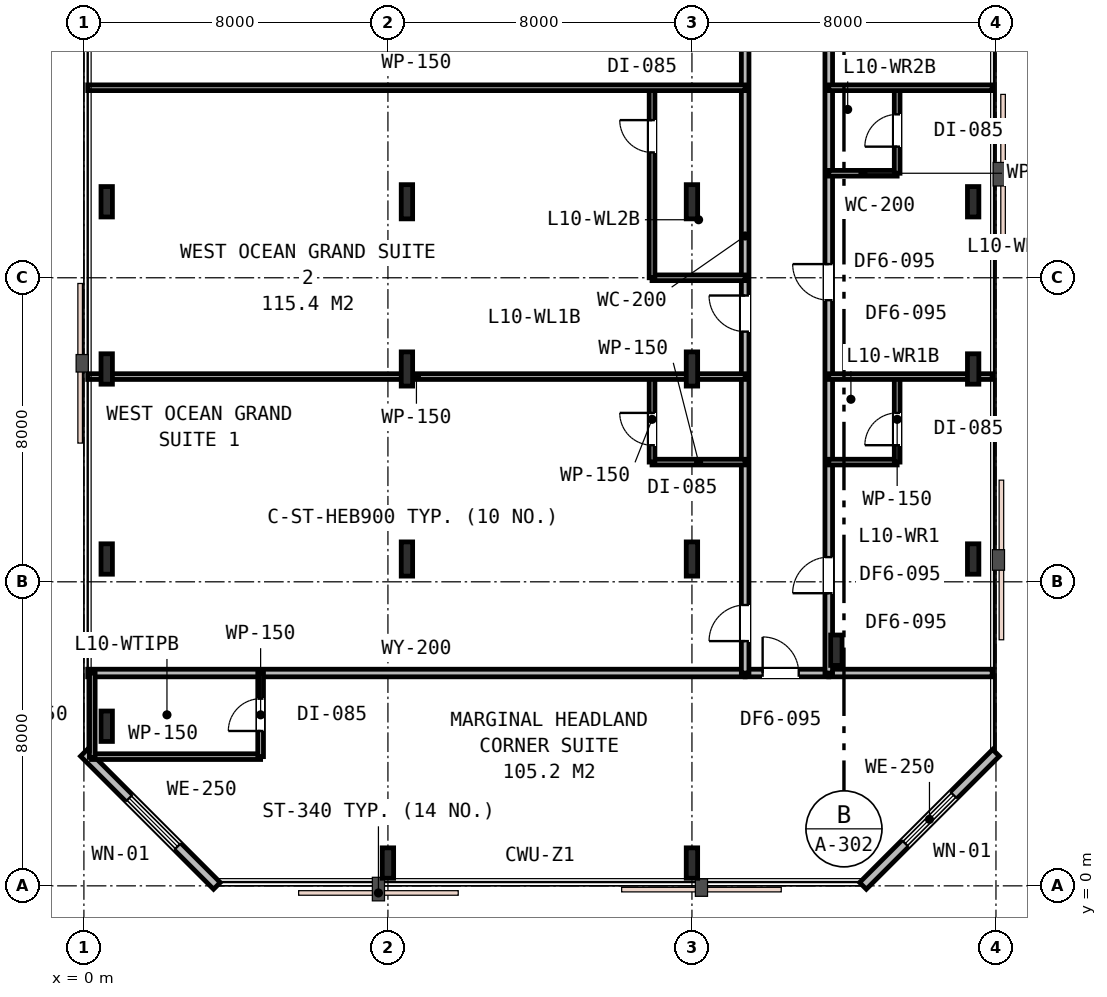
"""IFC4 building model, lengths in metres.
Left out: names, types, materials, properties, quantities, classifications, styles, units other than length and angle.
Written with IfcOpenShell. Run it as: python <this file> out.ifc"""

import sys

from ifc_helpers import new_model, si_unit, direction, frame, frame_2d, origin, origin_2d, place, context, subcontext, project, spatial, rectangle, i_section, extrude, element, fill, save


model = new_model("IFC4")
c1 = context("Model", 3, precision=1e-05, world=origin(), true_north=direction((0.0, 1.0)))
c2 = subcontext(c1, "Body", "Model", "MODEL_VIEW")
j1 = project(units=[si_unit("LENGTHUNIT", "METRE"), si_unit("PLANEANGLEUNIT", "RADIAN")], contexts=[c1])
p1 = place(None, origin())
s1 = spatial("IfcSite", under=j1, at=p1, CompositionType="ELEMENT")
p2 = place(p1, origin())
s2 = spatial("IfcBuilding", under=s1, at=p2, CompositionType="ELEMENT")
p3 = place(p2, frame((0.0, 0.0, 43.8)))
s3 = spatial("IfcBuildingStorey", under=s2, at=p3, CompositionType="ELEMENT", Elevation=43.8)
for number, where, z_axis, x_axis in (
    (1, (0.6, 8.6, 0.0), (0.0, 0.0, 1.0), (1.0, 0.0, 0.0)),
    (2, (0.6, 13.6, 0.0), (0.0, 0.0, 1.0), (1.0, 0.0, 0.0)),
    (3, (0.6, 18.0, 0.0), (0.0, 0.0, 1.0), (1.0, 0.0, 0.0)),
    (4, (0.6, 4.2, 0.0), (0.0, 0.0, 1.0), (1.0, 0.0, 0.0)),
    (5, (8.0, 0.6, 0.0), (0.0, 0.0, 1.0), (1.0, 0.0, 0.0)),
    (6, (16.0, 0.6, 0.0), (0.0, 0.0, 1.0), (1.0, 0.0, 0.0)),
    (7, (19.8, 6.2, 0.0), (0.0, 0.0, 1.0), (1.0, 0.0, 0.0)),
    (8, (23.4, 8.6, 0.0), (0.0, 0.0, 1.0), (1.0, 0.0, 0.0)),
    (9, (23.4, 13.6, 0.0), (0.0, 0.0, 1.0), (1.0, 0.0, 0.0)),
    (10, (23.4, 18.0, 0.0), (0.0, 0.0, 1.0), (1.0, 0.0, 0.0)),
):
    element("IfcColumn", number, at=place(p3, frame(where, z_axis=z_axis, x_axis=x_axis)), inside=s3, PredefinedType="COLUMN", context=c2, shape_type="SweptSolid", body=[
        extrude(i_section(OverallWidth=0.3, OverallDepth=0.8, WebThickness=0.018, FlangeThickness=0.033, FilletRadius=0.03, at=origin_2d()), origin(), (0.0, 0.0, 1.0), 3.6),
    ])
for number, where, z_axis, x_axis in (
    (11, (8.5, 8.6, 0.0), (0.0, 0.0, 1.0), (1.0, 0.0, 0.0)),
    (12, (16.0, 8.6, 0.0), (0.0, 0.0, 1.0), (1.0, 0.0, 0.0)),
    (13, (8.5, 13.6, 0.0), (0.0, 0.0, 1.0), (1.0, 0.0, 0.0)),
    (14, (16.0, 13.6, 0.0), (0.0, 0.0, 1.0), (1.0, 0.0, 0.0)),
    (15, (8.5, 18.0, 0.0), (0.0, 0.0, 1.0), (1.0, 0.0, 0.0)),
    (16, (16.0, 18.0, 0.0), (0.0, 0.0, 1.0), (1.0, 0.0, 0.0)),
):
    element("IfcColumn", number, at=place(p3, frame(where, z_axis=z_axis, x_axis=x_axis)), inside=s3, PredefinedType="COLUMN", context=c2, shape_type="SweptSolid", body=[
        extrude(i_section(OverallWidth=0.3, OverallDepth=0.9, WebThickness=0.018, FlangeThickness=0.035, FilletRadius=0.03, at=origin_2d()), origin(), (0.0, 0.0, 1.0), 3.6),
    ])
p4 = place(p3, frame((20.5, 0.0, 0.0), z_axis=(0.0, 0.0, 1.0), x_axis=(0.707106781187, 0.707106781187, 0.0)))
e17 = element("IfcWall", 17, at=p4, inside=s3, PredefinedType="STANDARD", context=c2, shape_type="SweptSolid", body=[
    extrude(rectangle(XDim=4.95, YDim=0.25, at=frame_2d((2.475, 0.0))), origin(), (0.0, 0.0, 1.0), 3.33),
])
p5 = place(p4, frame((1.575, 0.0, 0.75)))
e18 = element("IfcOpeningElement", 18, at=p5, cuts=e17, PredefinedType="OPENING", context=c2, shape_type="SweptSolid", body=[
    extrude(rectangle(XDim=1.8, YDim=1.85, at=frame_2d((0.9, 0.925))), frame((0.0, 0.135, 0.0), z_axis=(0.0, -1.0, 0.0), x_axis=(1.0, 0.0, 0.0)), (0.0, 0.0, 1.0), 0.27),
])
p6 = place(p3, frame((0.0, 3.5, 0.0), z_axis=(0.0, 0.0, 1.0), x_axis=(0.707106781187, -0.707106781187, 0.0)))
e19 = element("IfcWall", 19, at=p6, inside=s3, PredefinedType="STANDARD", context=c2, shape_type="SweptSolid", body=[
    extrude(rectangle(XDim=4.95, YDim=0.25, at=frame_2d((2.475, 0.0))), origin(), (0.0, 0.0, 1.0), 3.33),
])
p7 = place(p6, frame((1.685, 0.0, 0.75)))
e20 = element("IfcOpeningElement", 20, at=p7, cuts=e19, PredefinedType="OPENING", context=c2, shape_type="SweptSolid", body=[
    extrude(rectangle(XDim=1.8, YDim=1.85, at=frame_2d((0.9, 0.925))), frame((0.0, 0.135, 0.0), z_axis=(0.0, -1.0, 0.0), x_axis=(1.0, 0.0, 0.0)), (0.0, 0.0, 1.0), 0.27),
])
p8 = place(p3, frame((0.1, 5.6, 0.0), z_axis=(0.0, 0.0, 1.0), x_axis=(1.0, 0.0, 0.0)))
e21 = element("IfcWall", 21, at=p8, inside=s3, PredefinedType="PARTITIONING", context=c2, shape_type="SweptSolid", body=[
    extrude(rectangle(XDim=17.3, YDim=0.2, at=frame_2d((8.65, 0.0))), origin(), (0.0, 0.0, 1.0), 2.82),
])
p9 = place(p3, frame((19.6, 5.6, 0.0), z_axis=(0.0, 0.0, 1.0), x_axis=(1.0, 0.0, 0.0)))
e22 = element("IfcWall", 22, at=p9, inside=s3, PredefinedType="PARTITIONING", context=c2, shape_type="SweptSolid", body=[
    extrude(rectangle(XDim=4.3, YDim=0.2, at=frame_2d((2.15, 0.0))), origin(), (0.0, 0.0, 1.0), 3.33),
])
p10 = place(p3, frame((17.4, 5.6, 0.0), z_axis=(0.0, 0.0, 1.0), x_axis=(1.0, 0.0, 0.0)))
e23 = element("IfcWall", 23, at=p10, inside=s3, PredefinedType="PARTITIONING", context=c2, shape_type="SweptSolid", body=[
    extrude(rectangle(XDim=2.2, YDim=0.2, at=frame_2d((1.1, 0.0))), origin(), (0.0, 0.0, 1.0), 3.33),
])
p11 = place(p10, frame((0.46, 0.0, 0.0)))
e24 = element("IfcOpeningElement", 24, at=p11, cuts=e23, PredefinedType="OPENING", context=c2, shape_type="SweptSolid", body=[
    extrude(rectangle(XDim=0.95, YDim=2.15, at=frame_2d((0.475, 1.075))), frame((0.0, 0.11, 0.0), z_axis=(0.0, -1.0, 0.0), x_axis=(1.0, 0.0, 0.0)), (0.0, 0.0, 1.0), 0.22),
])
p12 = place(p3, frame((0.2, 3.4, 0.0), z_axis=(0.0, 0.0, 1.0), x_axis=(1.0, 0.0, 0.0)))
e25 = element("IfcWall", 25, at=p12, inside=s3, PredefinedType="PARTITIONING", context=c2, shape_type="SweptSolid", body=[
    extrude(rectangle(XDim=4.45, YDim=0.15, at=frame_2d((2.225, 0.0))), origin(), (0.0, 0.0, 1.0), 3.33),
])
p13 = place(p3, frame((4.65, 3.4, 0.0), z_axis=(0.0, 0.0, 1.0), x_axis=(0.0, 1.0, 0.0)))
e26 = element("IfcWall", 26, at=p13, inside=s3, PredefinedType="PARTITIONING", context=c2, shape_type="SweptSolid", body=[
    extrude(rectangle(XDim=2.2, YDim=0.15, at=frame_2d((1.1, 0.0))), origin(), (0.0, 0.0, 1.0), 3.33),
])
p14 = place(p13, frame((0.675, 0.0, 0.0)))
e27 = element("IfcOpeningElement", 27, at=p14, cuts=e26, PredefinedType="OPENING", context=c2, shape_type="SweptSolid", body=[
    extrude(rectangle(XDim=0.85, YDim=2.15, at=frame_2d((0.425, 1.075))), frame((0.0, 0.085, 0.0), z_axis=(0.0, -1.0, 0.0), x_axis=(1.0, 0.0, 0.0)), (0.0, 0.0, 1.0), 0.17),
])
p15 = place(p3, frame((0.22, 3.38, 0.0), z_axis=(0.0, 0.0, 1.0), x_axis=(0.0, 1.0, 0.0)))
e28 = element("IfcWall", 28, at=p15, inside=s3, PredefinedType="PARTITIONING", context=c2, shape_type="SweptSolid", body=[
    extrude(rectangle(XDim=2.22, YDim=0.15, at=frame_2d((1.11, 0.0))), origin(), (0.0, 0.0, 1.0), 2.93),
])
p16 = place(p3, frame((17.4, 5.6, 0.0), z_axis=(0.0, 0.0, 1.0), x_axis=(0.0, 1.0, 0.0)))
e29 = element("IfcWall", 29, at=p16, inside=s3, PredefinedType="PARTITIONING", context=c2, shape_type="SweptSolid", body=[
    extrude(rectangle(XDim=23.0, YDim=0.2, at=frame_2d((11.5, 0.0))), origin(), (0.0, 0.0, 1.0), 2.82),
])
p17 = place(p16, frame((0.84, 0.0, 0.0)))
e30 = element("IfcOpeningElement", 30, at=p17, cuts=e29, PredefinedType="OPENING", context=c2, shape_type="SweptSolid", body=[
    extrude(rectangle(XDim=0.95, YDim=2.15, at=frame_2d((0.475, 1.075))), frame((0.0, 0.11, 0.0), z_axis=(0.0, -1.0, 0.0), x_axis=(1.0, 0.0, 0.0)), (0.0, 0.0, 1.0), 0.22),
])
p18 = place(p16, frame((8.983, 0.0, 0.0)))
e31 = element("IfcOpeningElement", 31, at=p18, cuts=e29, PredefinedType="OPENING", context=c2, shape_type="SweptSolid", body=[
    extrude(rectangle(XDim=0.95, YDim=2.15, at=frame_2d((0.475, 1.075))), frame((0.0, 0.11, 0.0), z_axis=(0.0, -1.0, 0.0), x_axis=(1.0, 0.0, 0.0)), (0.0, 0.0, 1.0), 0.22),
])
p19 = place(p16, frame((16.476, 0.0, 0.0)))
e32 = element("IfcOpeningElement", 32, at=p19, cuts=e29, PredefinedType="OPENING", context=c2, shape_type="SweptSolid", body=[
    extrude(rectangle(XDim=0.95, YDim=2.15, at=frame_2d((0.475, 1.075))), frame((0.0, 0.11, 0.0), z_axis=(0.0, -1.0, 0.0), x_axis=(1.0, 0.0, 0.0)), (0.0, 0.0, 1.0), 0.22),
])
p20 = place(p3, frame((14.95, 11.15, 0.0), z_axis=(0.0, 0.0, 1.0), x_axis=(1.0, 0.0, 0.0)))
e33 = element("IfcWall", 33, at=p20, inside=s3, PredefinedType="PARTITIONING", context=c2, shape_type="SweptSolid", body=[
    extrude(rectangle(XDim=2.45, YDim=0.15, at=frame_2d((1.225, 0.0))), origin(), (0.0, 0.0, 1.0), 2.82),
])
p21 = place(p3, frame((14.95, 11.15, 0.0), z_axis=(0.0, 0.0, 1.0), x_axis=(0.0, 1.0, 0.0)))
e34 = element("IfcWall", 34, at=p21, inside=s3, PredefinedType="PARTITIONING", context=c2, shape_type="SweptSolid", body=[
    extrude(rectangle(XDim=2.25, YDim=0.15, at=frame_2d((1.125, 0.0))), origin(), (0.0, 0.0, 1.0), 2.82),
])
p22 = place(p21, frame((0.444, 0.0, 0.0)))
e35 = element("IfcOpeningElement", 35, at=p22, cuts=e34, PredefinedType="OPENING", context=c2, shape_type="SweptSolid", body=[
    extrude(rectangle(XDim=0.85, YDim=2.15, at=frame_2d((0.425, 1.075))), frame((0.0, 0.085, 0.0), z_axis=(0.0, -1.0, 0.0), x_axis=(1.0, 0.0, 0.0)), (0.0, 0.0, 1.0), 0.17),
])
p23 = place(p3, frame((0.1, 13.4, 0.0), z_axis=(0.0, 0.0, 1.0), x_axis=(1.0, 0.0, 0.0)))
e36 = element("IfcWall", 36, at=p23, inside=s3, PredefinedType="PARTITIONING", context=c2, shape_type="SweptSolid", body=[
    extrude(rectangle(XDim=17.3, YDim=0.15, at=frame_2d((8.65, 0.0))), origin(), (0.0, 0.0, 1.0), 2.82),
])
p24 = place(p3, frame((19.6, 5.6, 0.0), z_axis=(0.0, 0.0, 1.0), x_axis=(0.0, 1.0, 0.0)))
e37 = element("IfcWall", 37, at=p24, inside=s3, PredefinedType="PARTITIONING", context=c2, shape_type="SweptSolid", body=[
    extrude(rectangle(XDim=23.0, YDim=0.2, at=frame_2d((11.5, 0.0))), origin(), (0.0, 0.0, 1.0), 2.82),
])
p25 = place(p24, frame((2.1, 0.0, 0.0)))
e38 = element("IfcOpeningElement", 38, at=p25, cuts=e37, PredefinedType="OPENING", context=c2, shape_type="SweptSolid", body=[
    extrude(rectangle(XDim=0.95, YDim=2.15, at=frame_2d((0.475, 1.075))), frame((0.0, 0.11, 0.0), z_axis=(0.0, -1.0, 0.0), x_axis=(1.0, 0.0, 0.0)), (0.0, 0.0, 1.0), 0.22),
])
p26 = place(p24, frame((9.81, 0.0, 0.0)))
e39 = element("IfcOpeningElement", 39, at=p26, cuts=e37, PredefinedType="OPENING", context=c2, shape_type="SweptSolid", body=[
    extrude(rectangle(XDim=0.95, YDim=2.15, at=frame_2d((0.475, 1.075))), frame((0.0, 0.11, 0.0), z_axis=(0.0, -1.0, 0.0), x_axis=(1.0, 0.0, 0.0)), (0.0, 0.0, 1.0), 0.22),
])
p27 = place(p24, frame((17.41, 0.0, 0.0)))
e40 = element("IfcOpeningElement", 40, at=p27, cuts=e37, PredefinedType="OPENING", context=c2, shape_type="SweptSolid", body=[
    extrude(rectangle(XDim=0.95, YDim=2.15, at=frame_2d((0.475, 1.075))), frame((0.0, 0.11, 0.0), z_axis=(0.0, -1.0, 0.0), x_axis=(1.0, 0.0, 0.0)), (0.0, 0.0, 1.0), 0.22),
])
p28 = place(p3, frame((19.6, 11.15, 0.0), z_axis=(0.0, 0.0, 1.0), x_axis=(1.0, 0.0, 0.0)))
e41 = element("IfcWall", 41, at=p28, inside=s3, PredefinedType="PARTITIONING", context=c2, shape_type="SweptSolid", body=[
    extrude(rectangle(XDim=1.8, YDim=0.15, at=frame_2d((0.9, 0.0))), origin(), (0.0, 0.0, 1.0), 2.96),
])
p29 = place(p3, frame((21.4, 11.15, 0.0), z_axis=(0.0, 0.0, 1.0), x_axis=(0.0, 1.0, 0.0)))
e42 = element("IfcWall", 42, at=p29, inside=s3, PredefinedType="PARTITIONING", context=c2, shape_type="SweptSolid", body=[
    extrude(rectangle(XDim=2.25, YDim=0.15, at=frame_2d((1.125, 0.0))), origin(), (0.0, 0.0, 1.0), 2.82),
])
p30 = place(p29, frame((0.444, 0.0, 0.0)))
e43 = element("IfcOpeningElement", 43, at=p30, cuts=e42, PredefinedType="OPENING", context=c2, shape_type="SweptSolid", body=[
    extrude(rectangle(XDim=0.85, YDim=2.15, at=frame_2d((0.425, 1.075))), frame((0.0, 0.085, 0.0), z_axis=(0.0, -1.0, 0.0), x_axis=(1.0, 0.0, 0.0)), (0.0, 0.0, 1.0), 0.17),
])
p31 = place(p3, frame((19.6, 13.4, 0.0), z_axis=(0.0, 0.0, 1.0), x_axis=(1.0, 0.0, 0.0)))
e44 = element("IfcWall", 44, at=p31, inside=s3, PredefinedType="PARTITIONING", context=c2, shape_type="SweptSolid", body=[
    extrude(rectangle(XDim=4.3, YDim=0.15, at=frame_2d((2.15, 0.0))), origin(), (0.0, 0.0, 1.0), 2.82),
])
p32 = place(p3, frame((14.95, 16.0, 0.0), z_axis=(0.0, 0.0, 1.0), x_axis=(1.0, 0.0, 0.0)))
e45 = element("IfcWall", 45, at=p32, inside=s3, PredefinedType="PARTITIONING", context=c2, shape_type="SweptSolid", body=[
    extrude(rectangle(XDim=2.45, YDim=0.15, at=frame_2d((1.225, 0.0))), origin(), (0.0, 0.0, 1.0), 2.82),
])
p33 = place(p3, frame((14.95, 16.0, 0.0), z_axis=(0.0, 0.0, 1.0), x_axis=(0.0, 1.0, 0.0)))
e46 = element("IfcWall", 46, at=p33, inside=s3, PredefinedType="PARTITIONING", context=c2, shape_type="SweptSolid", body=[
    extrude(rectangle(XDim=5.0, YDim=0.15, at=frame_2d((2.5, 0.0))), origin(), (0.0, 0.0, 1.0), 2.82),
])
p34 = place(p33, frame((3.298, 0.0, 0.0)))
e47 = element("IfcOpeningElement", 47, at=p34, cuts=e46, PredefinedType="OPENING", context=c2, shape_type="SweptSolid", body=[
    extrude(rectangle(XDim=0.85, YDim=2.15, at=frame_2d((0.425, 1.075))), frame((0.0, 0.085, 0.0), z_axis=(0.0, -1.0, 0.0), x_axis=(1.0, 0.0, 0.0)), (0.0, 0.0, 1.0), 0.17),
])
p35 = place(p3, frame((0.1, 21.0, 0.0), z_axis=(0.0, 0.0, 1.0), x_axis=(1.0, 0.0, 0.0)))
e48 = element("IfcWall", 48, at=p35, inside=s3, PredefinedType="PARTITIONING", context=c2, shape_type="SweptSolid", body=[
    extrude(rectangle(XDim=17.3, YDim=0.15, at=frame_2d((8.65, 0.0))), origin(), (0.0, 0.0, 1.0), 2.82),
])
p36 = place(p3, frame((19.6, 18.75, 0.0), z_axis=(0.0, 0.0, 1.0), x_axis=(1.0, 0.0, 0.0)))
e49 = element("IfcWall", 49, at=p36, inside=s3, PredefinedType="PARTITIONING", context=c2, shape_type="SweptSolid", body=[
    extrude(rectangle(XDim=1.8, YDim=0.15, at=frame_2d((0.9, 0.0))), origin(), (0.0, 0.0, 1.0), 3.33),
])
p37 = place(p3, frame((21.4, 18.75, 0.0), z_axis=(0.0, 0.0, 1.0), x_axis=(0.0, 1.0, 0.0)))
e50 = element("IfcWall", 50, at=p37, inside=s3, PredefinedType="PARTITIONING", context=c2, shape_type="SweptSolid", body=[
    extrude(rectangle(XDim=2.25, YDim=0.15, at=frame_2d((1.125, 0.0))), origin(), (0.0, 0.0, 1.0), 3.33),
])
p38 = place(p37, frame((0.7, 0.0, 0.0)))
e51 = element("IfcOpeningElement", 51, at=p38, cuts=e50, PredefinedType="OPENING", context=c2, shape_type="SweptSolid", body=[
    extrude(rectangle(XDim=0.85, YDim=2.15, at=frame_2d((0.425, 1.075))), frame((0.0, 0.085, 0.0), z_axis=(0.0, -1.0, 0.0), x_axis=(1.0, 0.0, 0.0)), (0.0, 0.0, 1.0), 0.17),
])
p39 = place(p3, frame((19.6, 21.0, 0.0), z_axis=(0.0, 0.0, 1.0), x_axis=(1.0, 0.0, 0.0)))
e52 = element("IfcWall", 52, at=p39, inside=s3, PredefinedType="PARTITIONING", context=c2, shape_type="SweptSolid", body=[
    extrude(rectangle(XDim=4.3, YDim=0.15, at=frame_2d((2.15, 0.0))), origin(), (0.0, 0.0, 1.0), 3.33),
])
p40 = place(p5, origin())
e53 = element("IfcWindow", 53, at=p40, inside=s3, PartitioningType="SINGLE_PANEL", PredefinedType="WINDOW", context=c2, shape_type="SweptSolid", body=[
    extrude(rectangle(XDim=1.8, YDim=1.85, at=frame_2d((0.9, 0.925))), frame((0.0, 0.03, 0.0), z_axis=(0.0, -1.0, 0.0), x_axis=(1.0, 0.0, 0.0)), (0.0, 0.0, 1.0), 0.06),
])
fill(e18, e53)
p41 = place(p7, origin())
e54 = element("IfcWindow", 54, at=p41, inside=s3, PartitioningType="SINGLE_PANEL", PredefinedType="WINDOW", context=c2, shape_type="SweptSolid", body=[
    extrude(rectangle(XDim=1.8, YDim=1.85, at=frame_2d((0.9, 0.925))), frame((0.0, 0.03, 0.0), z_axis=(0.0, -1.0, 0.0), x_axis=(1.0, 0.0, 0.0)), (0.0, 0.0, 1.0), 0.06),
])
fill(e20, e54)
p42 = place(p11, origin())
e55 = element("IfcDoor", 55, at=p42, inside=s3, OperationType="SINGLE_SWING_LEFT", PredefinedType="DOOR", context=c2, shape_type="SweptSolid", body=[
    extrude(rectangle(XDim=0.95, YDim=2.15, at=frame_2d((0.475, 1.075))), frame((0.0, 0.025, 0.0), z_axis=(0.0, -1.0, 0.0), x_axis=(1.0, 0.0, 0.0)), (0.0, 0.0, 1.0), 0.05),
])
fill(e24, e55)
p43 = place(p14, origin())
e56 = element("IfcDoor", 56, at=p43, inside=s3, OperationType="SINGLE_SWING_LEFT", PredefinedType="DOOR", context=c2, shape_type="SweptSolid", body=[
    extrude(rectangle(XDim=0.85, YDim=2.15, at=frame_2d((0.425, 1.075))), frame((0.0, 0.025, 0.0), z_axis=(0.0, -1.0, 0.0), x_axis=(1.0, 0.0, 0.0)), (0.0, 0.0, 1.0), 0.05),
])
fill(e27, e56)
p44 = place(p17, origin())
e57 = element("IfcDoor", 57, at=p44, inside=s3, OperationType="SINGLE_SWING_LEFT", PredefinedType="DOOR", context=c2, shape_type="SweptSolid", body=[
    extrude(rectangle(XDim=0.95, YDim=2.15, at=frame_2d((0.475, 1.075))), frame((0.0, 0.025, 0.0), z_axis=(0.0, -1.0, 0.0), x_axis=(1.0, 0.0, 0.0)), (0.0, 0.0, 1.0), 0.05),
])
fill(e30, e57)
p45 = place(p22, origin())
e58 = element("IfcDoor", 58, at=p45, inside=s3, OperationType="SINGLE_SWING_RIGHT", PredefinedType="DOOR", context=c2, shape_type="SweptSolid", body=[
    extrude(rectangle(XDim=0.85, YDim=2.15, at=frame_2d((0.425, 1.075))), frame((0.0, 0.025, 0.0), z_axis=(0.0, -1.0, 0.0), x_axis=(1.0, 0.0, 0.0)), (0.0, 0.0, 1.0), 0.05),
])
fill(e35, e58)
p46 = place(p25, origin())
e59 = element("IfcDoor", 59, at=p46, inside=s3, OperationType="SINGLE_SWING_LEFT", PredefinedType="DOOR", context=c2, shape_type="SweptSolid", body=[
    extrude(rectangle(XDim=0.95, YDim=2.15, at=frame_2d((0.475, 1.075))), frame((0.0, 0.025, 0.0), z_axis=(0.0, -1.0, 0.0), x_axis=(1.0, 0.0, 0.0)), (0.0, 0.0, 1.0), 0.05),
])
fill(e38, e59)
p47 = place(p30, origin())
e60 = element("IfcDoor", 60, at=p47, inside=s3, OperationType="SINGLE_SWING_LEFT", PredefinedType="DOOR", context=c2, shape_type="SweptSolid", body=[
    extrude(rectangle(XDim=0.85, YDim=2.15, at=frame_2d((0.425, 1.075))), frame((0.0, 0.025, 0.0), z_axis=(0.0, -1.0, 0.0), x_axis=(1.0, 0.0, 0.0)), (0.0, 0.0, 1.0), 0.05),
])
fill(e43, e60)
p48 = place(p18, origin())
e61 = element("IfcDoor", 61, at=p48, inside=s3, OperationType="SINGLE_SWING_RIGHT", PredefinedType="DOOR", context=c2, shape_type="SweptSolid", body=[
    extrude(rectangle(XDim=0.95, YDim=2.15, at=frame_2d((0.475, 1.075))), frame((0.0, 0.025, 0.0), z_axis=(0.0, -1.0, 0.0), x_axis=(1.0, 0.0, 0.0)), (0.0, 0.0, 1.0), 0.05),
])
fill(e31, e61)
p49 = place(p34, origin())
e62 = element("IfcDoor", 62, at=p49, inside=s3, OperationType="SINGLE_SWING_RIGHT", PredefinedType="DOOR", context=c2, shape_type="SweptSolid", body=[
    extrude(rectangle(XDim=0.85, YDim=2.15, at=frame_2d((0.425, 1.075))), frame((0.0, 0.025, 0.0), z_axis=(0.0, -1.0, 0.0), x_axis=(1.0, 0.0, 0.0)), (0.0, 0.0, 1.0), 0.05),
])
fill(e47, e62)
p50 = place(p26, origin())
e63 = element("IfcDoor", 63, at=p50, inside=s3, OperationType="SINGLE_SWING_RIGHT", PredefinedType="DOOR", context=c2, shape_type="SweptSolid", body=[
    extrude(rectangle(XDim=0.95, YDim=2.15, at=frame_2d((0.475, 1.075))), frame((0.0, 0.025, 0.0), z_axis=(0.0, -1.0, 0.0), x_axis=(1.0, 0.0, 0.0)), (0.0, 0.0, 1.0), 0.05),
])
fill(e39, e63)
p51 = place(p38, origin())
e64 = element("IfcDoor", 64, at=p51, inside=s3, OperationType="SINGLE_SWING_LEFT", PredefinedType="DOOR", context=c2, shape_type="SweptSolid", body=[
    extrude(rectangle(XDim=0.85, YDim=2.15, at=frame_2d((0.425, 1.075))), frame((0.0, 0.025, 0.0), z_axis=(0.0, -1.0, 0.0), x_axis=(1.0, 0.0, 0.0)), (0.0, 0.0, 1.0), 0.05),
])
fill(e51, e64)
save(model, sys.argv[1])
